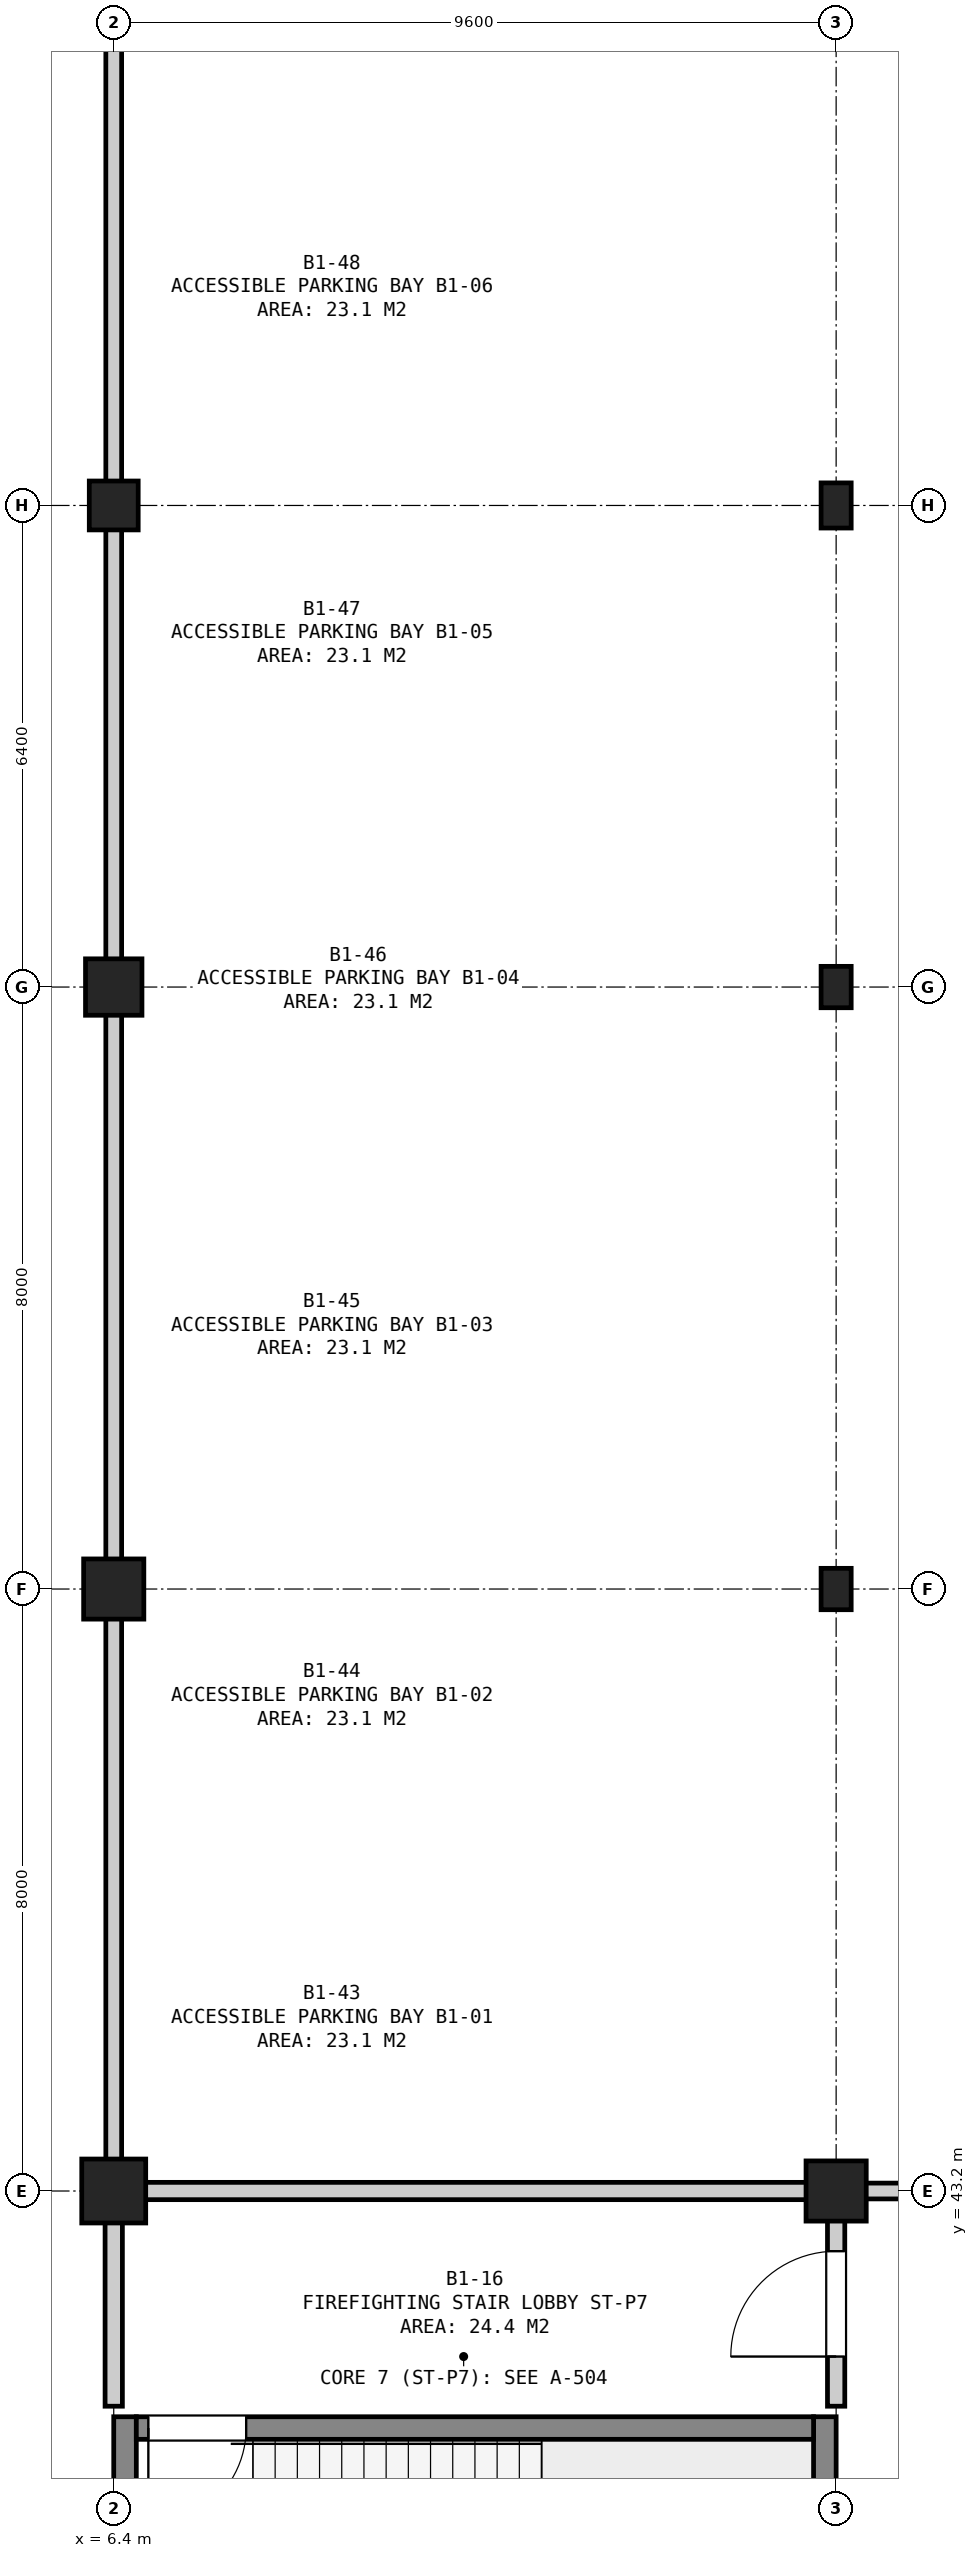
"""IFC4 building model, lengths in metres.
Left out: names, types, materials, properties, quantities, classifications, styles, units other than length and angle.
Written with IfcOpenShell. Run it as: python <this file> out.ifc"""

import sys

from ifc_helpers import new_model, si_unit, direction, frame, frame_2d, origin, origin_2d, place, context, subcontext, project, spatial, rectangle, extrude, element, fill, save


model = new_model("IFC4")
c1 = context("Model", 3, precision=1e-05, world=origin(), true_north=direction((0.0, 1.0)))
c2 = subcontext(c1, "Body", "Model", "MODEL_VIEW")
j1 = project(units=[si_unit("LENGTHUNIT", "METRE"), si_unit("PLANEANGLEUNIT", "RADIAN")], contexts=[c1])
p1 = place(None, origin())
s1 = spatial("IfcSite", under=j1, at=p1, CompositionType="ELEMENT")
p2 = place(p1, origin())
s2 = spatial("IfcBuilding", under=s1, at=p2, CompositionType="ELEMENT")
p3 = place(p2, frame((0.0, 0.0, -4.5)))
s3 = spatial("IfcBuildingStorey", under=s2, at=p3, CompositionType="ELEMENT", Elevation=-4.5)
p4 = place(p3, frame((6.4, 43.2, 0.0), z_axis=(0.0, 0.0, 1.0), x_axis=(1.0, 0.0, 0.0)))
e1 = element("IfcColumn", 1, at=p4, inside=s3, PredefinedType="COLUMN", context=c2, shape_type="SweptSolid", body=[
    extrude(rectangle(XDim=0.85, YDim=0.85, at=origin_2d()), origin(), (0.0, 0.0, 1.0), 4.5),
])
p5 = place(p3, frame((6.4, 51.2, 0.0), z_axis=(0.0, 0.0, 1.0), x_axis=(1.0, 0.0, 0.0)))
e2 = element("IfcColumn", 2, at=p5, inside=s3, PredefinedType="COLUMN", context=c2, shape_type="SweptSolid", body=[
    extrude(rectangle(XDim=0.8, YDim=0.8, at=origin_2d()), origin(), (0.0, 0.0, 1.0), 4.5),
])
p6 = place(p3, frame((6.4, 59.2, 0.0), z_axis=(0.0, 0.0, 1.0), x_axis=(1.0, 0.0, 0.0)))
e3 = element("IfcColumn", 3, at=p6, inside=s3, PredefinedType="COLUMN", context=c2, shape_type="SweptSolid", body=[
    extrude(rectangle(XDim=0.75, YDim=0.75, at=origin_2d()), origin(), (0.0, 0.0, 1.0), 4.5),
])
p7 = place(p3, frame((6.4, 65.6, 0.0), z_axis=(0.0, 0.0, 1.0), x_axis=(1.0, 0.0, 0.0)))
e4 = element("IfcColumn", 4, at=p7, inside=s3, PredefinedType="COLUMN", context=c2, shape_type="SweptSolid", body=[
    extrude(rectangle(XDim=0.65, YDim=0.65, at=origin_2d()), origin(), (0.0, 0.0, 1.0), 4.5),
])
p8 = place(p3, frame((16.0, 43.2, 0.0), z_axis=(0.0, 0.0, 1.0), x_axis=(1.0, 0.0, 0.0)))
e5 = element("IfcColumn", 5, at=p8, inside=s3, PredefinedType="COLUMN", context=c2, shape_type="SweptSolid", body=[
    extrude(rectangle(XDim=0.8, YDim=0.8, at=origin_2d()), origin(), (0.0, 0.0, 1.0), 4.5),
])
for number, where, z_axis, x_axis in (
    (6, (16.0, 51.2, 0.0), (0.0, 0.0, 1.0), (1.0, 0.0, 0.0)),
    (7, (16.0, 59.2, 0.0), (0.0, 0.0, 1.0), (1.0, 0.0, 0.0)),
):
    element("IfcColumn", number, at=place(p3, frame(where, z_axis=z_axis, x_axis=x_axis)), inside=s3, PredefinedType="COLUMN", context=c2, shape_type="SweptSolid", body=[
        extrude(rectangle(XDim=0.4, YDim=0.55, at=origin_2d()), origin(), (0.0, 0.0, 1.0), 4.5),
    ])
p9 = place(p3, frame((16.0, 65.6, 0.0), z_axis=(0.0, 0.0, 1.0), x_axis=(1.0, 0.0, 0.0)))
e8 = element("IfcColumn", 8, at=p9, inside=s3, PredefinedType="COLUMN", context=c2, shape_type="SweptSolid", body=[
    extrude(rectangle(XDim=0.4, YDim=0.6, at=origin_2d()), origin(), (0.0, 0.0, 1.0), 4.5),
])
for number, where, z_axis, x_axis in (
    (9, (6.55, 36.0, 0.0), (0.0, 0.0, 1.0), (0.0, 1.0, 0.0)),
    (10, (15.85, 36.0, 0.0), (0.0, 0.0, 1.0), (0.0, 1.0, 0.0)),
):
    element("IfcWall", number, at=place(p3, frame(where, z_axis=z_axis, x_axis=x_axis)), inside=s3, PredefinedType="SHEAR", context=c2, shape_type="SweptSolid", body=[
        extrude(rectangle(XDim=4.2, YDim=0.3, at=frame_2d((2.1, 0.0))), origin(), (0.0, 0.0, 1.0), 4.08),
    ])
p10 = place(p3, frame((6.7, 40.05, 0.0), z_axis=(0.0, 0.0, 1.0), x_axis=(1.0, 0.0, 0.0)))
e11 = element("IfcWall", 11, at=p10, inside=s3, PredefinedType="SHEAR", context=c2, shape_type="SweptSolid", body=[
    extrude(rectangle(XDim=9.0, YDim=0.3, at=frame_2d((4.5, 0.0))), origin(), (0.0, 0.0, 1.0), 4.08),
])
p11 = place(p10, frame((0.16, 0.0, 0.0)))
e12 = element("IfcOpeningElement", 12, at=p11, cuts=e11, PredefinedType="OPENING", context=c2, shape_type="SweptSolid", body=[
    extrude(rectangle(XDim=1.3, YDim=2.18, at=frame_2d((0.65, 1.09))), frame((0.0, 0.162, 0.0), z_axis=(0.0, -1.0, 0.0), x_axis=(1.0, 0.0, 0.0)), (0.0, 0.0, 1.0), 0.324),
])
p12 = place(p3, frame((6.54, 43.2, 0.0), z_axis=(0.0, 0.0, 1.0), x_axis=(1.0, 0.0, 0.0)))
e13 = element("IfcWall", 13, at=p12, inside=s3, PredefinedType="SOLIDWALL", context=c2, shape_type="SweptSolid", body=[
    extrude(rectangle(XDim=9.32, YDim=0.23, at=frame_2d((4.66, 0.0))), origin(), (0.0, 0.0, 1.0), 3.575),
])
p13 = place(p3, frame((6.4, 40.34, 0.0), z_axis=(0.0, 0.0, 1.0), x_axis=(0.0, 1.0, 0.0)))
e14 = element("IfcWall", 14, at=p13, inside=s3, PredefinedType="SOLIDWALL", context=c2, shape_type="SweptSolid", body=[
    extrude(rectangle(XDim=2.72, YDim=0.23, at=frame_2d((1.36, 0.0))), origin(), (0.0, 0.0, 1.0), 3.475),
])
p14 = place(p3, frame((16.0, 40.34, 0.0), z_axis=(0.0, 0.0, 1.0), x_axis=(0.0, 1.0, 0.0)))
e15 = element("IfcWall", 15, at=p14, inside=s3, PredefinedType="SOLIDWALL", context=c2, shape_type="SweptSolid", body=[
    extrude(rectangle(XDim=2.72, YDim=0.23, at=frame_2d((1.36, 0.0))), origin(), (0.0, 0.0, 1.0), 3.475),
])
p15 = place(p14, frame((0.66, 0.0, 0.0)))
e16 = element("IfcOpeningElement", 16, at=p15, cuts=e15, PredefinedType="OPENING", context=c2, shape_type="SweptSolid", body=[
    extrude(rectangle(XDim=1.4, YDim=2.2, at=frame_2d((0.7, 1.1))), frame((0.0, 0.127, 0.0), z_axis=(0.0, -1.0, 0.0), x_axis=(1.0, 0.0, 0.0)), (0.0, 0.0, 1.0), 0.254),
])
p16 = place(p3, frame((16.0, 43.2, 0.0), z_axis=(0.0, 0.0, 1.0), x_axis=(1.0, 0.0, 0.0)))
e17 = element("IfcWall", 17, at=p16, inside=s3, PredefinedType="SOLIDWALL", context=c2, shape_type="SweptSolid", body=[
    extrude(rectangle(XDim=19.06, YDim=0.21, at=frame_2d((9.53, 0.0))), origin(), (0.0, 0.0, 1.0), 3.575),
])
p17 = place(p3, frame((6.4, 43.34, 0.0), z_axis=(0.0, 0.0, 1.0), x_axis=(0.0, 1.0, 0.0)))
e18 = element("IfcWall", 18, at=p17, inside=s3, PredefinedType="SOLIDWALL", context=c2, shape_type="SweptSolid", body=[
    extrude(rectangle(XDim=52.12, YDim=0.21, at=frame_2d((26.06, 0.0))), origin(), (0.0, 0.0, 1.0), 3.325),
])
p18 = place(p11, frame((1.3, 0.0, 0.0), z_axis=(0.0, 0.0, 1.0), x_axis=(-1.0, 0.0, 0.0)))
e19 = element("IfcDoor", 19, at=p18, inside=s3, OperationType="SINGLE_SWING_RIGHT", PredefinedType="DOOR", context=c2, shape_type="SweptSolid", body=[
    extrude(rectangle(XDim=1.3, YDim=2.18, at=frame_2d((0.65, 1.09))), frame((0.0, 0.025, 0.0), z_axis=(0.0, -1.0, 0.0), x_axis=(1.0, 0.0, 0.0)), (0.0, 0.0, 1.0), 0.05),
])
fill(e12, e19)
p19 = place(p15, origin())
e20 = element("IfcDoor", 20, at=p19, inside=s3, OperationType="SINGLE_SWING_LEFT", PredefinedType="DOOR", context=c2, shape_type="SweptSolid", body=[
    extrude(rectangle(XDim=1.4, YDim=2.2, at=frame_2d((0.7, 1.1))), frame((0.0, 0.025, 0.0), z_axis=(0.0, -1.0, 0.0), x_axis=(1.0, 0.0, 0.0)), (0.0, 0.0, 1.0), 0.05),
])
fill(e16, e20)
save(model, sys.argv[1])
